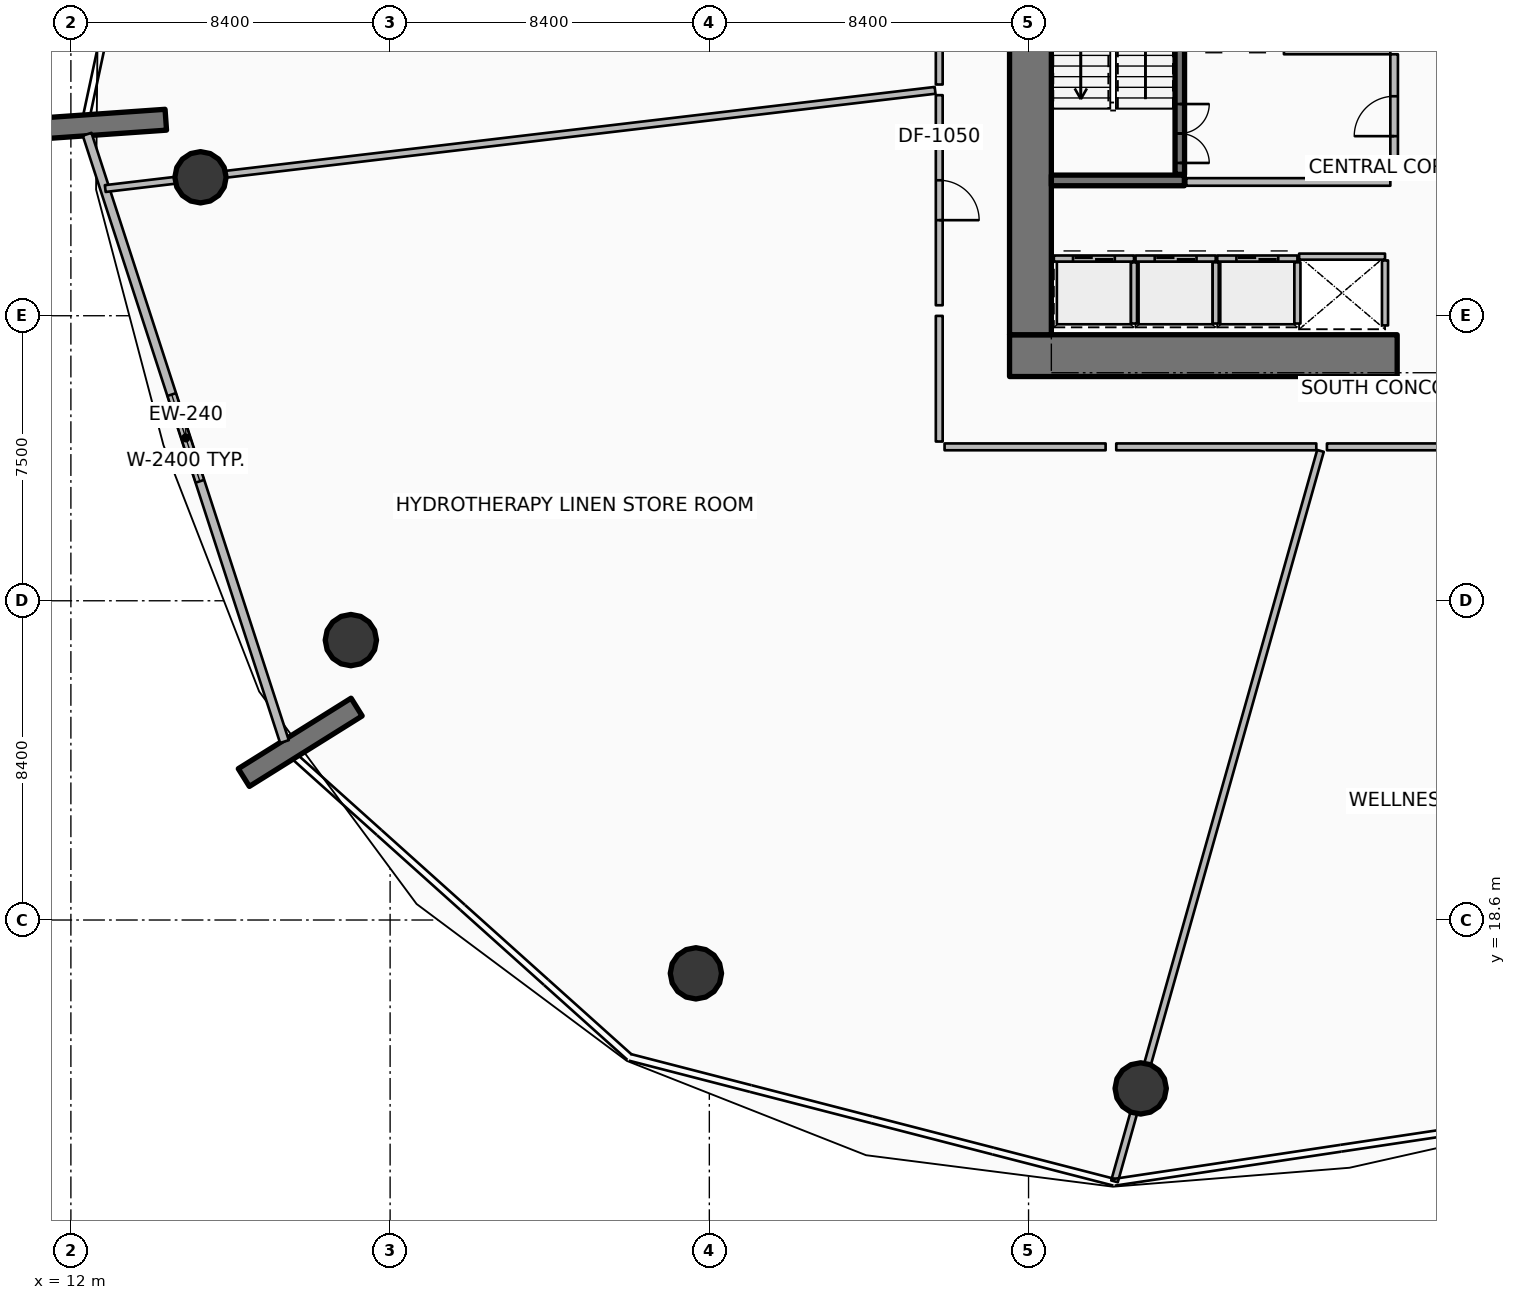
"""IFC4 building model, lengths in metres.
Left out: names, types, materials, properties, quantities, classifications, styles, units other than length and angle.
Written with IfcOpenShell. Run it as: python <this file> out.ifc"""

import sys

from ifc_helpers import new_model, si_unit, direction, frame, frame_2d, origin, origin_2d, place, context, subcontext, project, spatial, rectangle, circle, extrude, element, fill, save


model = new_model("IFC4")
c1 = context("Model", 3, precision=1e-05, world=origin(), true_north=direction((0.0, 1.0)))
c2 = subcontext(c1, "Body", "Model", "MODEL_VIEW")
j1 = project(units=[si_unit("LENGTHUNIT", "METRE"), si_unit("PLANEANGLEUNIT", "RADIAN")], contexts=[c1])
p1 = place(None, origin())
s1 = spatial("IfcSite", under=j1, at=p1, CompositionType="ELEMENT")
p2 = place(p1, origin())
s2 = spatial("IfcBuilding", under=s1, at=p2, CompositionType="ELEMENT")
p3 = place(p2, frame((0.0, 0.0, 12.0)))
s3 = spatial("IfcBuildingStorey", under=s2, at=p3, CompositionType="ELEMENT", Elevation=12.0)
p4 = place(p3, frame((36.7, 33.45, 0.0), z_axis=(0.0, 0.0, 1.0), x_axis=(1.0, 0.0, 0.0)))
e1 = element("IfcWall", 1, at=p4, inside=s3, PredefinedType="SHEAR", context=c2, shape_type="SweptSolid", body=[
    extrude(rectangle(XDim=10.2, YDim=1.1, at=frame_2d((5.1, 0.0))), origin(), (0.0, 0.0, 1.0), 4.8),
])
p5 = place(p3, frame((37.25, 34.0, 0.0), z_axis=(0.0, 0.0, 1.0), x_axis=(0.0, 1.0, 0.0)))
e2 = element("IfcWall", 2, at=p5, inside=s3, PredefinedType="SHEAR", context=c2, shape_type="SweptSolid", body=[
    extrude(rectangle(XDim=16.0, YDim=1.1, at=frame_2d((8.0, 0.0))), origin(), (0.0, 0.0, 1.0), 4.8),
])
p6 = place(p3, frame((37.8, 38.06, 0.0), z_axis=(0.0, 0.0, 1.0), x_axis=(1.0, 0.0, 0.0)))
e3 = element("IfcWall", 3, at=p6, inside=s3, PredefinedType="SHEAR", context=c2, shape_type="SweptSolid", body=[
    extrude(rectangle(XDim=3.5, YDim=0.28, at=frame_2d((1.75, 0.0))), origin(), (0.0, 0.0, 1.0), 4.8),
])
for number, where, z_axis, x_axis in (
    (4, (14.497, 39.657, 0.0), (0.0, 0.0, 1.0), (-0.998, -0.07, 0.0)),
    (5, (19.519, 24.203, 0.0), (0.0, 0.0, 1.0), (-0.848, -0.53, 0.0)),
):
    element("IfcWall", number, at=place(p3, frame(where, z_axis=z_axis, x_axis=x_axis)), inside=s3, PredefinedType="SOLIDWALL", context=c2, shape_type="SweptSolid", body=[
        extrude(rectangle(XDim=3.5, YDim=0.55, at=frame_2d((1.75, 0.0))), origin(), (0.0, 0.0, 1.0), 4.8),
    ])
for number, where, z_axis, x_axis in (
    (6, (15.41, 38.143, 0.0), (0.0, 0.0, 1.0), (1.0, 0.0, 0.0)),
    (7, (19.367, 25.965, 0.0), (0.0, 0.0, 1.0), (1.0, 0.0, 0.0)),
    (8, (28.447, 17.197, 0.0), (0.0, 0.0, 1.0), (1.0, 0.0, 0.0)),
    (9, (40.151, 14.169, 0.0), (0.0, 0.0, 1.0), (1.0, 0.0, 0.0)),
):
    element("IfcColumn", number, at=place(p3, frame(where, z_axis=z_axis, x_axis=x_axis)), inside=s3, PredefinedType="COLUMN", context=c2, shape_type="SweptSolid", body=[
        extrude(circle(Radius=0.675, at=origin_2d()), origin(), (0.0, 0.0, 1.0), 4.48),
    ])
p7 = place(p3, frame((12.427, 39.275, 0.0), z_axis=(0.0, 0.0, 1.0), x_axis=(0.309022005354, -0.951054888115, 0.0)))
e10 = element("IfcWall", 10, at=p7, inside=s3, PredefinedType="SOLIDWALL", context=c2, shape_type="SweptSolid", body=[
    extrude(rectangle(XDim=16.803, YDim=0.24, at=frame_2d((8.401, 0.0))), origin(), (0.0, 0.0, 1.0), 3.43),
])
p8 = place(p7, frame((7.201, 0.0, 0.85)))
e11 = element("IfcOpeningElement", 11, at=p8, cuts=e10, PredefinedType="OPENING", context=c2, shape_type="SweptSolid", body=[
    extrude(rectangle(XDim=2.4, YDim=2.1, at=frame_2d((1.2, 1.05))), frame((0.0, 0.13, 0.0), z_axis=(0.0, -1.0, 0.0), x_axis=(1.0, 0.0, 0.0)), (0.0, 0.0, 1.0), 0.26),
])
p9 = place(p3, frame((41.18, 38.22, 0.0), z_axis=(0.0, 0.0, 1.0), x_axis=(0.0, 1.0, 0.0)))
e12 = element("IfcWall", 12, at=p9, inside=s3, PredefinedType="SOLIDWALL", context=c2, shape_type="SweptSolid", body=[
    extrude(rectangle(XDim=7.56, YDim=0.25, at=frame_2d((3.78, 0.0))), origin(), (0.0, 0.0, 1.0), 4.48),
])
p10 = place(p9, frame((0.3, 0.0, 0.0)))
e13 = element("IfcOpeningElement", 13, at=p10, cuts=e12, PredefinedType="OPENING", context=c2, shape_type="SweptSolid", body=[
    extrude(rectangle(XDim=1.55, YDim=2.15, at=frame_2d((0.775, 1.075))), frame((0.0, 0.135, 0.0), z_axis=(0.0, -1.0, 0.0), x_axis=(1.0, 0.0, 0.0)), (0.0, 0.0, 1.0), 0.27),
])
p11 = place(p3, frame((37.865, 36.005, 0.0), z_axis=(0.0, 0.0, 1.0), x_axis=(1.0, 0.0, 0.0)))
e14 = element("IfcWall", 14, at=p11, inside=s3, PredefinedType="PARTITIONING", context=c2, shape_type="SweptSolid", body=[
    extrude(rectangle(XDim=2.11, YDim=0.16, at=frame_2d((1.055, 0.0))), origin(), (0.0, 0.0, 1.0), 4.48),
])
p12 = place(p11, frame((0.505, 0.0, 0.0)))
e15 = element("IfcOpeningElement", 15, at=p12, cuts=e14, PredefinedType="OPENING", context=c2, shape_type="SweptSolid", body=[
    extrude(rectangle(XDim=1.1, YDim=2.1, at=frame_2d((0.55, 1.05))), frame((0.0, 0.09, 0.0), z_axis=(0.0, -1.0, 0.0), x_axis=(1.0, 0.0, 0.0)), (0.0, 0.0, 1.0), 0.18),
])
p13 = place(p3, frame((39.975, 34.295, 0.0), z_axis=(0.0, 0.0, 1.0), x_axis=(0.0, 1.0, 0.0)))
e16 = element("IfcWall", 16, at=p13, inside=s3, PredefinedType="PARTITIONING", context=c2, shape_type="SweptSolid", body=[
    extrude(rectangle(XDim=1.61, YDim=0.16, at=frame_2d((0.805, 0.0))), origin(), (0.0, 0.0, 1.0), 4.48),
])
p14 = place(p3, frame((40.015, 36.005, 0.0), z_axis=(0.0, 0.0, 1.0), x_axis=(1.0, 0.0, 0.0)))
e17 = element("IfcWall", 17, at=p14, inside=s3, PredefinedType="PARTITIONING", context=c2, shape_type="SweptSolid", body=[
    extrude(rectangle(XDim=2.11, YDim=0.16, at=frame_2d((1.055, 0.0))), origin(), (0.0, 0.0, 1.0), 4.48),
])
p15 = place(p14, frame((0.505, 0.0, 0.0)))
e18 = element("IfcOpeningElement", 18, at=p15, cuts=e17, PredefinedType="OPENING", context=c2, shape_type="SweptSolid", body=[
    extrude(rectangle(XDim=1.1, YDim=2.1, at=frame_2d((0.55, 1.05))), frame((0.0, 0.09, 0.0), z_axis=(0.0, -1.0, 0.0), x_axis=(1.0, 0.0, 0.0)), (0.0, 0.0, 1.0), 0.18),
])
p16 = place(p3, frame((42.125, 34.295, 0.0), z_axis=(0.0, 0.0, 1.0), x_axis=(0.0, 1.0, 0.0)))
e19 = element("IfcWall", 19, at=p16, inside=s3, PredefinedType="PARTITIONING", context=c2, shape_type="SweptSolid", body=[
    extrude(rectangle(XDim=1.61, YDim=0.16, at=frame_2d((0.805, 0.0))), origin(), (0.0, 0.0, 1.0), 4.48),
])
p17 = place(p3, frame((42.165, 36.005, 0.0), z_axis=(0.0, 0.0, 1.0), x_axis=(1.0, 0.0, 0.0)))
e20 = element("IfcWall", 20, at=p17, inside=s3, PredefinedType="PARTITIONING", context=c2, shape_type="SweptSolid", body=[
    extrude(rectangle(XDim=2.11, YDim=0.16, at=frame_2d((1.055, 0.0))), origin(), (0.0, 0.0, 1.0), 4.48),
])
p18 = place(p17, frame((0.505, 0.0, 0.0)))
e21 = element("IfcOpeningElement", 21, at=p18, cuts=e20, PredefinedType="OPENING", context=c2, shape_type="SweptSolid", body=[
    extrude(rectangle(XDim=1.1, YDim=2.1, at=frame_2d((0.55, 1.05))), frame((0.0, 0.09, 0.0), z_axis=(0.0, -1.0, 0.0), x_axis=(1.0, 0.0, 0.0)), (0.0, 0.0, 1.0), 0.18),
])
p19 = place(p3, frame((44.275, 34.295, 0.0), z_axis=(0.0, 0.0, 1.0), x_axis=(0.0, 1.0, 0.0)))
e22 = element("IfcWall", 22, at=p19, inside=s3, PredefinedType="PARTITIONING", context=c2, shape_type="SweptSolid", body=[
    extrude(rectangle(XDim=1.61, YDim=0.16, at=frame_2d((0.805, 0.0))), origin(), (0.0, 0.0, 1.0), 4.48),
])
p20 = place(p3, frame((44.32, 36.055, 0.0), z_axis=(0.0, 0.0, 1.0), x_axis=(1.0, 0.0, 0.0)))
e23 = element("IfcWall", 23, at=p20, inside=s3, PredefinedType="PARTITIONING", context=c2, shape_type="SweptSolid", body=[
    extrude(rectangle(XDim=2.26, YDim=0.16, at=frame_2d((1.13, 0.0))), origin(), (0.0, 0.0, 1.0), 4.48),
])
p21 = place(p3, frame((46.58, 34.245, 0.0), z_axis=(0.0, 0.0, 1.0), x_axis=(0.0, 1.0, 0.0)))
e24 = element("IfcWall", 24, at=p21, inside=s3, PredefinedType="PARTITIONING", context=c2, shape_type="SweptSolid", body=[
    extrude(rectangle(XDim=1.71, YDim=0.16, at=frame_2d((0.855, 0.0))), origin(), (0.0, 0.0, 1.0), 4.48),
])
p22 = place(p3, frame((41.35, 38.02, 0.0), z_axis=(0.0, 0.0, 1.0), x_axis=(1.0, 0.0, 0.0)))
e25 = element("IfcWall", 25, at=p22, inside=s3, PredefinedType="PARTITIONING", context=c2, shape_type="SweptSolid", body=[
    extrude(rectangle(XDim=5.37, YDim=0.2, at=frame_2d((2.685, 0.0))), origin(), (0.0, 0.0, 1.0), 4.48),
])
p23 = place(p3, frame((43.92, 41.48, 0.0), z_axis=(0.0, 0.0, 1.0), x_axis=(1.0, 0.0, 0.0)))
e26 = element("IfcWall", 26, at=p23, inside=s3, PredefinedType="PARTITIONING", context=c2, shape_type="SweptSolid", body=[
    extrude(rectangle(XDim=2.8, YDim=0.2, at=frame_2d((1.4, 0.0))), origin(), (0.0, 0.0, 1.0), 4.48),
])
p24 = place(p3, frame((46.82, 38.12, 0.0), z_axis=(0.0, 0.0, 1.0), x_axis=(0.0, 1.0, 0.0)))
e27 = element("IfcWall", 27, at=p24, inside=s3, PredefinedType="PARTITIONING", context=c2, shape_type="SweptSolid", body=[
    extrude(rectangle(XDim=3.26, YDim=0.2, at=frame_2d((1.63, 0.0))), origin(), (0.0, 0.0, 1.0), 4.48),
])
p25 = place(p24, frame((1.105, 0.0, 0.0)))
e28 = element("IfcOpeningElement", 28, at=p25, cuts=e27, PredefinedType="OPENING", context=c2, shape_type="SweptSolid", body=[
    extrude(rectangle(XDim=1.05, YDim=2.1, at=frame_2d((0.525, 1.05))), frame((0.0, 0.11, 0.0), z_axis=(0.0, -1.0, 0.0), x_axis=(1.0, 0.0, 0.0)), (0.0, 0.0, 1.0), 0.22),
])
p26 = place(p3, frame((34.85, 45.569, 0.0), z_axis=(0.0, 0.0, 1.0), x_axis=(0.0, -1.0, 0.0)))
e29 = element("IfcWall", 29, at=p26, inside=s3, PredefinedType="PARTITIONING", context=c2, shape_type="SweptSolid", body=[
    extrude(rectangle(XDim=4.985, YDim=0.18, at=frame_2d((2.493, 0.0))), origin(), (0.0, 0.0, 1.0), 3.693),
])
p27 = place(p3, frame((34.741, 40.431, 0.0), z_axis=(0.0, 0.0, 1.0), x_axis=(-0.993068662125, -0.117535663975, 0.0)))
e30 = element("IfcWall", 30, at=p27, inside=s3, PredefinedType="PARTITIONING", context=c2, shape_type="SweptSolid", body=[
    extrude(rectangle(XDim=21.989, YDim=0.18, at=frame_2d((10.994, 0.0))), origin(), (0.0, 0.0, 1.0), 3.693),
])
p28 = place(p3, frame((34.85, 40.304, 0.0), z_axis=(0.0, 0.0, 1.0), x_axis=(0.0, -1.0, 0.0)))
e31 = element("IfcWall", 31, at=p28, inside=s3, PredefinedType="PARTITIONING", context=c2, shape_type="SweptSolid", body=[
    extrude(rectangle(XDim=5.528, YDim=0.18, at=frame_2d((2.764, 0.0))), origin(), (0.0, 0.0, 1.0), 3.693),
])
p29 = place(p28, frame((2.239, 0.0, 0.0)))
e32 = element("IfcOpeningElement", 32, at=p29, cuts=e31, PredefinedType="OPENING", context=c2, shape_type="SweptSolid", body=[
    extrude(rectangle(XDim=1.05, YDim=2.1, at=frame_2d((0.525, 1.05))), frame((0.0, 0.1, 0.0), z_axis=(0.0, -1.0, 0.0), x_axis=(1.0, 0.0, 0.0)), (0.0, 0.0, 1.0), 0.2),
])
p30 = place(p3, frame((34.85, 34.496, 0.0), z_axis=(0.0, 0.0, 1.0), x_axis=(0.0, -1.0, 0.0)))
e33 = element("IfcWall", 33, at=p30, inside=s3, PredefinedType="PARTITIONING", context=c2, shape_type="SweptSolid", body=[
    extrude(rectangle(XDim=3.306, YDim=0.18, at=frame_2d((1.653, 0.0))), origin(), (0.0, 0.0, 1.0), 3.693),
])
p31 = place(p3, frame((34.99, 31.05, 0.0), z_axis=(0.0, 0.0, 1.0), x_axis=(1.0, 0.0, 0.0)))
e34 = element("IfcWall", 34, at=p31, inside=s3, PredefinedType="PARTITIONING", context=c2, shape_type="SweptSolid", body=[
    extrude(rectangle(XDim=4.238, YDim=0.18, at=frame_2d((2.119, 0.0))), origin(), (0.0, 0.0, 1.0), 3.693),
])
p32 = place(p3, frame((39.508, 31.05, 0.0), z_axis=(0.0, 0.0, 1.0), x_axis=(1.0, 0.0, 0.0)))
e35 = element("IfcWall", 35, at=p32, inside=s3, PredefinedType="PARTITIONING", context=c2, shape_type="SweptSolid", body=[
    extrude(rectangle(XDim=5.264, YDim=0.18, at=frame_2d((2.632, 0.0))), origin(), (0.0, 0.0, 1.0), 3.693),
])
p33 = place(p3, frame((44.882, 30.944, 0.0), z_axis=(0.0, 0.0, 1.0), x_axis=(-0.271438678553, -0.962455736014, 0.0)))
e36 = element("IfcWall", 36, at=p33, inside=s3, PredefinedType="PARTITIONING", context=c2, shape_type="SweptSolid", body=[
    extrude(rectangle(XDim=19.971, YDim=0.18, at=frame_2d((9.985, 0.0))), origin(), (0.0, 0.0, 1.0), 3.693),
])
p34 = place(p3, frame((45.052, 31.05, 0.0), z_axis=(0.0, 0.0, 1.0), x_axis=(1.0, 0.0, 0.0)))
e37 = element("IfcWall", 37, at=p34, inside=s3, PredefinedType="PARTITIONING", context=c2, shape_type="SweptSolid", body=[
    extrude(rectangle(XDim=4.104, YDim=0.18, at=frame_2d((2.052, 0.0))), origin(), (0.0, 0.0, 1.0), 3.693),
])
p35 = place(p8, origin())
e38 = element("IfcWindow", 38, at=p35, inside=s3, PartitioningType="SINGLE_PANEL", PredefinedType="WINDOW", context=c2, shape_type="SweptSolid", body=[
    extrude(rectangle(XDim=2.4, YDim=2.1, at=frame_2d((1.2, 1.05))), frame((0.0, 0.03, 0.0), z_axis=(0.0, -1.0, 0.0), x_axis=(1.0, 0.0, 0.0)), (0.0, 0.0, 1.0), 0.06),
])
fill(e11, e38)
p36 = place(p10, origin())
e39 = element("IfcDoor", 39, at=p36, inside=s3, OperationType="DOUBLE_DOOR_SINGLE_SWING", PredefinedType="DOOR", context=c2, shape_type="SweptSolid", body=[
    extrude(rectangle(XDim=1.55, YDim=2.15, at=frame_2d((0.775, 1.075))), frame((0.0, 0.025, 0.0), z_axis=(0.0, -1.0, 0.0), x_axis=(1.0, 0.0, 0.0)), (0.0, 0.0, 1.0), 0.05),
])
fill(e13, e39)
p37 = place(p12, origin())
e40 = element("IfcDoor", 40, at=p37, inside=s3, OperationType="DOUBLE_DOOR_SLIDING", PredefinedType="DOOR", context=c2, shape_type="SweptSolid", body=[
    extrude(rectangle(XDim=1.1, YDim=2.1, at=frame_2d((0.55, 1.05))), frame((0.0, 0.025, 0.0), z_axis=(0.0, -1.0, 0.0), x_axis=(1.0, 0.0, 0.0)), (0.0, 0.0, 1.0), 0.05),
])
fill(e15, e40)
p38 = place(p15, origin())
e41 = element("IfcDoor", 41, at=p38, inside=s3, OperationType="DOUBLE_DOOR_SLIDING", PredefinedType="DOOR", context=c2, shape_type="SweptSolid", body=[
    extrude(rectangle(XDim=1.1, YDim=2.1, at=frame_2d((0.55, 1.05))), frame((0.0, 0.025, 0.0), z_axis=(0.0, -1.0, 0.0), x_axis=(1.0, 0.0, 0.0)), (0.0, 0.0, 1.0), 0.05),
])
fill(e18, e41)
p39 = place(p18, origin())
e42 = element("IfcDoor", 42, at=p39, inside=s3, OperationType="DOUBLE_DOOR_SLIDING", PredefinedType="DOOR", context=c2, shape_type="SweptSolid", body=[
    extrude(rectangle(XDim=1.1, YDim=2.1, at=frame_2d((0.55, 1.05))), frame((0.0, 0.025, 0.0), z_axis=(0.0, -1.0, 0.0), x_axis=(1.0, 0.0, 0.0)), (0.0, 0.0, 1.0), 0.05),
])
fill(e21, e42)
p40 = place(p25, origin())
e43 = element("IfcDoor", 43, at=p40, inside=s3, OperationType="SINGLE_SWING_LEFT", PredefinedType="DOOR", context=c2, shape_type="SweptSolid", body=[
    extrude(rectangle(XDim=1.05, YDim=2.1, at=frame_2d((0.525, 1.05))), frame((0.0, 0.025, 0.0), z_axis=(0.0, -1.0, 0.0), x_axis=(1.0, 0.0, 0.0)), (0.0, 0.0, 1.0), 0.05),
])
fill(e28, e43)
p41 = place(p29, origin())
e44 = element("IfcDoor", 44, at=p41, inside=s3, OperationType="SINGLE_SWING_RIGHT", PredefinedType="DOOR", context=c2, shape_type="SweptSolid", body=[
    extrude(rectangle(XDim=1.05, YDim=2.1, at=frame_2d((0.525, 1.05))), frame((0.0, 0.025, 0.0), z_axis=(0.0, -1.0, 0.0), x_axis=(1.0, 0.0, 0.0)), (0.0, 0.0, 1.0), 0.05),
])
fill(e32, e44)
save(model, sys.argv[1])
